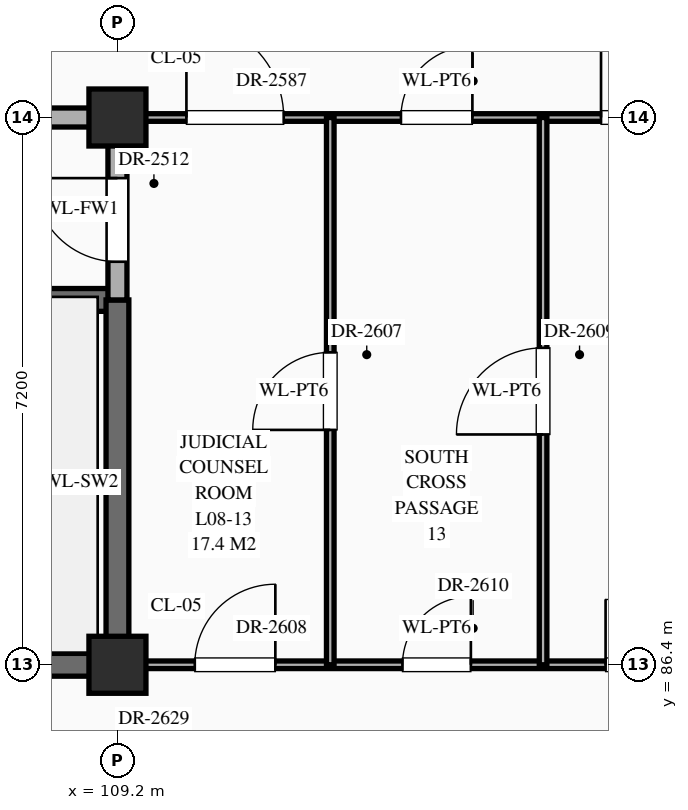
"""IFC4 building model, lengths in metres.
Left out: names, types, materials, properties, quantities, classifications, styles, units other than length and angle.
Written with IfcOpenShell. Run it as: python <this file> out.ifc"""

import sys

from ifc_helpers import new_model, si_unit, direction, frame, frame_2d, origin, origin_2d, place, context, subcontext, project, spatial, rectangle, extrude, element, fill, save


model = new_model("IFC4")
c1 = context("Model", 3, precision=1e-05, world=origin(), true_north=direction((0.0, 1.0)))
c2 = subcontext(c1, "Body", "Model", "MODEL_VIEW")
j1 = project(units=[si_unit("LENGTHUNIT", "METRE"), si_unit("PLANEANGLEUNIT", "RADIAN")], contexts=[c1])
p1 = place(None, origin())
s1 = spatial("IfcSite", under=j1, at=p1, CompositionType="ELEMENT")
p2 = place(p1, origin())
s2 = spatial("IfcBuilding", under=s1, at=p2, CompositionType="ELEMENT")
p3 = place(p2, frame((0.0, 0.0, 35.1)))
s3 = spatial("IfcBuildingStorey", under=s2, at=p3, CompositionType="ELEMENT", Elevation=35.1)
for number, where, z_axis, x_axis in (
    (1, (109.2, 86.4, 0.0), (0.0, 0.0, 1.0), (1.0, 0.0, 0.0)),
    (2, (109.2, 93.6, 0.0), (0.0, 0.0, 1.0), (1.0, 0.0, 0.0)),
):
    element("IfcColumn", number, at=place(p3, frame(where, z_axis=z_axis, x_axis=x_axis)), inside=s3, PredefinedType="COLUMN", context=c2, shape_type="SweptSolid", body=[
        extrude(rectangle(XDim=0.75, YDim=0.75, at=origin_2d()), origin(), (0.0, 0.0, 1.0), 4.2),
    ])
p4 = place(p3, frame((100.8, 86.4, 0.0), z_axis=(0.0, 0.0, 1.0), x_axis=(1.0, 0.0, 0.0)))
e3 = element("IfcWall", 3, at=p4, inside=s3, PredefinedType="SHEAR", context=c2, shape_type="SweptSolid", body=[
    extrude(rectangle(XDim=8.4, YDim=0.3, at=frame_2d((4.2, 0.0))), origin(), (0.0, 0.0, 1.0), 3.95),
])
p5 = place(p3, frame((109.2, 86.4, 0.0), z_axis=(0.0, 0.0, 1.0), x_axis=(1.0, 0.0, 0.0)))
e4 = element("IfcWall", 4, at=p5, inside=s3, PredefinedType="STANDARD", context=c2, shape_type="SweptSolid", body=[
    extrude(rectangle(XDim=8.4, YDim=0.1, at=frame_2d((4.2, 0.0))), origin(), (0.0, 0.0, 1.0), 3.1),
])
p6 = place(p5, frame((1.018, 0.0, 0.0)))
e5 = element("IfcOpeningElement", 5, at=p6, cuts=e4, PredefinedType="OPENING", context=c2, shape_type="SweptSolid", body=[
    extrude(rectangle(XDim=1.06, YDim=2.4, at=frame_2d((0.53, 1.2))), frame((0.0, 0.062, 0.0), z_axis=(0.0, -1.0, 0.0), x_axis=(1.0, 0.0, 0.0)), (0.0, 0.0, 1.0), 0.124),
])
p7 = place(p5, frame((3.75, 0.0, 0.0)))
e6 = element("IfcOpeningElement", 6, at=p7, cuts=e4, PredefinedType="OPENING", context=c2, shape_type="SweptSolid", body=[
    extrude(rectangle(XDim=0.9, YDim=2.15, at=frame_2d((0.45, 1.075))), frame((0.0, 0.062, 0.0), z_axis=(0.0, -1.0, 0.0), x_axis=(1.0, 0.0, 0.0)), (0.0, 0.0, 1.0), 0.124),
])
p8 = place(p5, frame((6.423, 0.0, 0.0)))
e7 = element("IfcOpeningElement", 7, at=p8, cuts=e4, PredefinedType="OPENING", context=c2, shape_type="SweptSolid", body=[
    extrude(rectangle(XDim=0.86, YDim=2.1, at=frame_2d((0.43, 1.05))), frame((0.0, 0.062, 0.0), z_axis=(0.0, -1.0, 0.0), x_axis=(1.0, 0.0, 0.0)), (0.0, 0.0, 1.0), 0.124),
])
p9 = place(p3, frame((100.8, 91.2, 0.0), z_axis=(0.0, 0.0, 1.0), x_axis=(1.0, 0.0, 0.0)))
e8 = element("IfcWall", 8, at=p9, inside=s3, PredefinedType="SHEAR", context=c2, shape_type="SweptSolid", body=[
    extrude(rectangle(XDim=8.4, YDim=0.3, at=frame_2d((4.2, 0.0))), origin(), (0.0, 0.0, 1.0), 3.95),
])
p10 = place(p9, frame((0.65, 0.0, 0.0)))
e9 = element("IfcOpeningElement", 9, at=p10, cuts=e8, PredefinedType="OPENING", context=c2, shape_type="SweptSolid", body=[
    extrude(rectangle(XDim=1.1, YDim=2.2, at=frame_2d((0.55, 1.1))), frame((0.0, 0.162, 0.0), z_axis=(0.0, -1.0, 0.0), x_axis=(1.0, 0.0, 0.0)), (0.0, 0.0, 1.0), 0.324),
])
p11 = place(p3, frame((100.8, 93.6, 0.0), z_axis=(0.0, 0.0, 1.0), x_axis=(1.0, 0.0, 0.0)))
e10 = element("IfcWall", 10, at=p11, inside=s3, PredefinedType="STANDARD", context=c2, shape_type="SweptSolid", body=[
    extrude(rectangle(XDim=8.4, YDim=0.25, at=frame_2d((4.2, 0.0))), origin(), (0.0, 0.0, 1.0), 3.1),
])
p12 = place(p11, frame((3.2, 0.0, 0.0)))
e11 = element("IfcOpeningElement", 11, at=p12, cuts=e10, PredefinedType="OPENING", context=c2, shape_type="SweptSolid", body=[
    extrude(rectangle(XDim=2.0, YDim=2.4, at=frame_2d((1.0, 1.2))), frame((0.0, 0.137, 0.0), z_axis=(0.0, -1.0, 0.0), x_axis=(1.0, 0.0, 0.0)), (0.0, 0.0, 1.0), 0.274),
])
p13 = place(p3, frame((109.2, 93.6, 0.0), z_axis=(0.0, 0.0, 1.0), x_axis=(1.0, 0.0, 0.0)))
e12 = element("IfcWall", 12, at=p13, inside=s3, PredefinedType="STANDARD", context=c2, shape_type="SweptSolid", body=[
    extrude(rectangle(XDim=8.4, YDim=0.1, at=frame_2d((4.2, 0.0))), origin(), (0.0, 0.0, 1.0), 3.1),
])
p14 = place(p13, frame((0.907, 0.0, 0.0)))
e13 = element("IfcOpeningElement", 13, at=p14, cuts=e12, PredefinedType="OPENING", context=c2, shape_type="SweptSolid", body=[
    extrude(rectangle(XDim=1.28, YDim=2.35, at=frame_2d((0.64, 1.175))), frame((0.0, 0.062, 0.0), z_axis=(0.0, -1.0, 0.0), x_axis=(1.0, 0.0, 0.0)), (0.0, 0.0, 1.0), 0.124),
])
p15 = place(p13, frame((3.73, 0.0, 0.0)))
e14 = element("IfcOpeningElement", 14, at=p15, cuts=e12, PredefinedType="OPENING", context=c2, shape_type="SweptSolid", body=[
    extrude(rectangle(XDim=0.94, YDim=2.3, at=frame_2d((0.47, 1.15))), frame((0.0, 0.062, 0.0), z_axis=(0.0, -1.0, 0.0), x_axis=(1.0, 0.0, 0.0)), (0.0, 0.0, 1.0), 0.124),
])
p16 = place(p13, frame((6.363, 0.0, 0.0)))
e15 = element("IfcOpeningElement", 15, at=p16, cuts=e12, PredefinedType="OPENING", context=c2, shape_type="SweptSolid", body=[
    extrude(rectangle(XDim=0.98, YDim=2.35, at=frame_2d((0.49, 1.175))), frame((0.0, 0.062, 0.0), z_axis=(0.0, -1.0, 0.0), x_axis=(1.0, 0.0, 0.0)), (0.0, 0.0, 1.0), 0.124),
])
p17 = place(p3, frame((109.2, 86.4, 0.0), z_axis=(0.0, 0.0, 1.0), x_axis=(0.0, 1.0, 0.0)))
e16 = element("IfcWall", 16, at=p17, inside=s3, PredefinedType="SHEAR", context=c2, shape_type="SweptSolid", body=[
    extrude(rectangle(XDim=4.8, YDim=0.3, at=frame_2d((2.4, 0.0))), origin(), (0.0, 0.0, 1.0), 3.95),
])
p18 = place(p3, frame((109.2, 91.2, 0.0), z_axis=(0.0, 0.0, 1.0), x_axis=(0.0, 1.0, 0.0)))
e17 = element("IfcWall", 17, at=p18, inside=s3, PredefinedType="STANDARD", context=c2, shape_type="SweptSolid", body=[
    extrude(rectangle(XDim=2.4, YDim=0.25, at=frame_2d((1.2, 0.0))), origin(), (0.0, 0.0, 1.0), 3.2),
])
p19 = place(p18, frame((0.502, 0.0, 0.0)))
e18 = element("IfcOpeningElement", 18, at=p19, cuts=e17, PredefinedType="OPENING", context=c2, shape_type="SweptSolid", body=[
    extrude(rectangle(XDim=1.1, YDim=2.2, at=frame_2d((0.55, 1.1))), frame((0.0, 0.137, 0.0), z_axis=(0.0, -1.0, 0.0), x_axis=(1.0, 0.0, 0.0)), (0.0, 0.0, 1.0), 0.274),
])
p20 = place(p3, frame((112.0, 86.4, 0.0), z_axis=(0.0, 0.0, 1.0), x_axis=(0.0, 1.0, 0.0)))
e19 = element("IfcWall", 19, at=p20, inside=s3, PredefinedType="STANDARD", context=c2, shape_type="SweptSolid", body=[
    extrude(rectangle(XDim=7.2, YDim=0.1, at=frame_2d((3.6, 0.0))), origin(), (0.0, 0.0, 1.0), 3.95),
])
p21 = place(p20, frame((3.09, 0.0, 0.0)))
e20 = element("IfcOpeningElement", 20, at=p21, cuts=e19, PredefinedType="OPENING", context=c2, shape_type="SweptSolid", body=[
    extrude(rectangle(XDim=1.02, YDim=2.4, at=frame_2d((0.51, 1.2))), frame((0.0, 0.062, 0.0), z_axis=(0.0, -1.0, 0.0), x_axis=(1.0, 0.0, 0.0)), (0.0, 0.0, 1.0), 0.124),
])
p22 = place(p3, frame((114.8, 86.4, 0.0), z_axis=(0.0, 0.0, 1.0), x_axis=(0.0, 1.0, 0.0)))
e21 = element("IfcWall", 21, at=p22, inside=s3, PredefinedType="STANDARD", context=c2, shape_type="SweptSolid", body=[
    extrude(rectangle(XDim=7.2, YDim=0.1, at=frame_2d((3.6, 0.0))), origin(), (0.0, 0.0, 1.0), 3.95),
])
p23 = place(p22, frame((3.03, 0.0, 0.0)))
e22 = element("IfcOpeningElement", 22, at=p23, cuts=e21, PredefinedType="OPENING", context=c2, shape_type="SweptSolid", body=[
    extrude(rectangle(XDim=1.14, YDim=2.4, at=frame_2d((0.57, 1.2))), frame((0.0, 0.062, 0.0), z_axis=(0.0, -1.0, 0.0), x_axis=(1.0, 0.0, 0.0)), (0.0, 0.0, 1.0), 0.124),
])
p24 = place(p19, origin())
e23 = element("IfcDoor", 23, at=p24, inside=s3, OperationType="SINGLE_SWING_RIGHT", PredefinedType="DOOR", context=c2, shape_type="SweptSolid", body=[
    extrude(rectangle(XDim=1.1, YDim=2.2, at=frame_2d((0.55, 1.1))), frame((0.0, 0.025, 0.0), z_axis=(0.0, -1.0, 0.0), x_axis=(1.0, 0.0, 0.0)), (0.0, 0.0, 1.0), 0.05),
])
fill(e18, e23)
p25 = place(p14, origin())
e24 = element("IfcDoor", 24, at=p25, inside=s3, OperationType="SINGLE_SWING_LEFT", PredefinedType="DOOR", context=c2, shape_type="SweptSolid", body=[
    extrude(rectangle(XDim=1.28, YDim=2.35, at=frame_2d((0.64, 1.175))), frame((0.0, 0.025, 0.0), z_axis=(0.0, -1.0, 0.0), x_axis=(1.0, 0.0, 0.0)), (0.0, 0.0, 1.0), 0.05),
])
fill(e13, e24)
p26 = place(p15, origin())
e25 = element("IfcDoor", 25, at=p26, inside=s3, OperationType="SINGLE_SWING_RIGHT", PredefinedType="DOOR", context=c2, shape_type="SweptSolid", body=[
    extrude(rectangle(XDim=0.94, YDim=2.3, at=frame_2d((0.47, 1.15))), frame((0.0, 0.025, 0.0), z_axis=(0.0, -1.0, 0.0), x_axis=(1.0, 0.0, 0.0)), (0.0, 0.0, 1.0), 0.05),
])
fill(e14, e25)
p27 = place(p16, origin())
e26 = element("IfcDoor", 26, at=p27, inside=s3, OperationType="SINGLE_SWING_LEFT", PredefinedType="DOOR", context=c2, shape_type="SweptSolid", body=[
    extrude(rectangle(XDim=0.98, YDim=2.35, at=frame_2d((0.49, 1.175))), frame((0.0, 0.025, 0.0), z_axis=(0.0, -1.0, 0.0), x_axis=(1.0, 0.0, 0.0)), (0.0, 0.0, 1.0), 0.05),
])
fill(e15, e26)
p28 = place(p21, origin())
e27 = element("IfcDoor", 27, at=p28, inside=s3, OperationType="SINGLE_SWING_LEFT", PredefinedType="DOOR", context=c2, shape_type="SweptSolid", body=[
    extrude(rectangle(XDim=1.02, YDim=2.4, at=frame_2d((0.51, 1.2))), frame((0.0, 0.025, 0.0), z_axis=(0.0, -1.0, 0.0), x_axis=(1.0, 0.0, 0.0)), (0.0, 0.0, 1.0), 0.05),
])
fill(e20, e27)
p29 = place(p6, origin())
e28 = element("IfcDoor", 28, at=p29, inside=s3, OperationType="SINGLE_SWING_RIGHT", PredefinedType="DOOR", context=c2, shape_type="SweptSolid", body=[
    extrude(rectangle(XDim=1.06, YDim=2.4, at=frame_2d((0.53, 1.2))), frame((0.0, 0.025, 0.0), z_axis=(0.0, -1.0, 0.0), x_axis=(1.0, 0.0, 0.0)), (0.0, 0.0, 1.0), 0.05),
])
fill(e5, e28)
p30 = place(p23, origin())
e29 = element("IfcDoor", 29, at=p30, inside=s3, OperationType="SINGLE_SWING_LEFT", PredefinedType="DOOR", context=c2, shape_type="SweptSolid", body=[
    extrude(rectangle(XDim=1.14, YDim=2.4, at=frame_2d((0.57, 1.2))), frame((0.0, 0.025, 0.0), z_axis=(0.0, -1.0, 0.0), x_axis=(1.0, 0.0, 0.0)), (0.0, 0.0, 1.0), 0.05),
])
fill(e22, e29)
p31 = place(p7, origin())
e30 = element("IfcDoor", 30, at=p31, inside=s3, OperationType="SINGLE_SWING_RIGHT", PredefinedType="DOOR", context=c2, shape_type="SweptSolid", body=[
    extrude(rectangle(XDim=0.9, YDim=2.15, at=frame_2d((0.45, 1.075))), frame((0.0, 0.025, 0.0), z_axis=(0.0, -1.0, 0.0), x_axis=(1.0, 0.0, 0.0)), (0.0, 0.0, 1.0), 0.05),
])
fill(e6, e30)
p32 = place(p8, origin())
e31 = element("IfcDoor", 31, at=p32, inside=s3, OperationType="SINGLE_SWING_LEFT", PredefinedType="DOOR", context=c2, shape_type="SweptSolid", body=[
    extrude(rectangle(XDim=0.86, YDim=2.1, at=frame_2d((0.43, 1.05))), frame((0.0, 0.025, 0.0), z_axis=(0.0, -1.0, 0.0), x_axis=(1.0, 0.0, 0.0)), (0.0, 0.0, 1.0), 0.05),
])
fill(e7, e31)
save(model, sys.argv[1])
